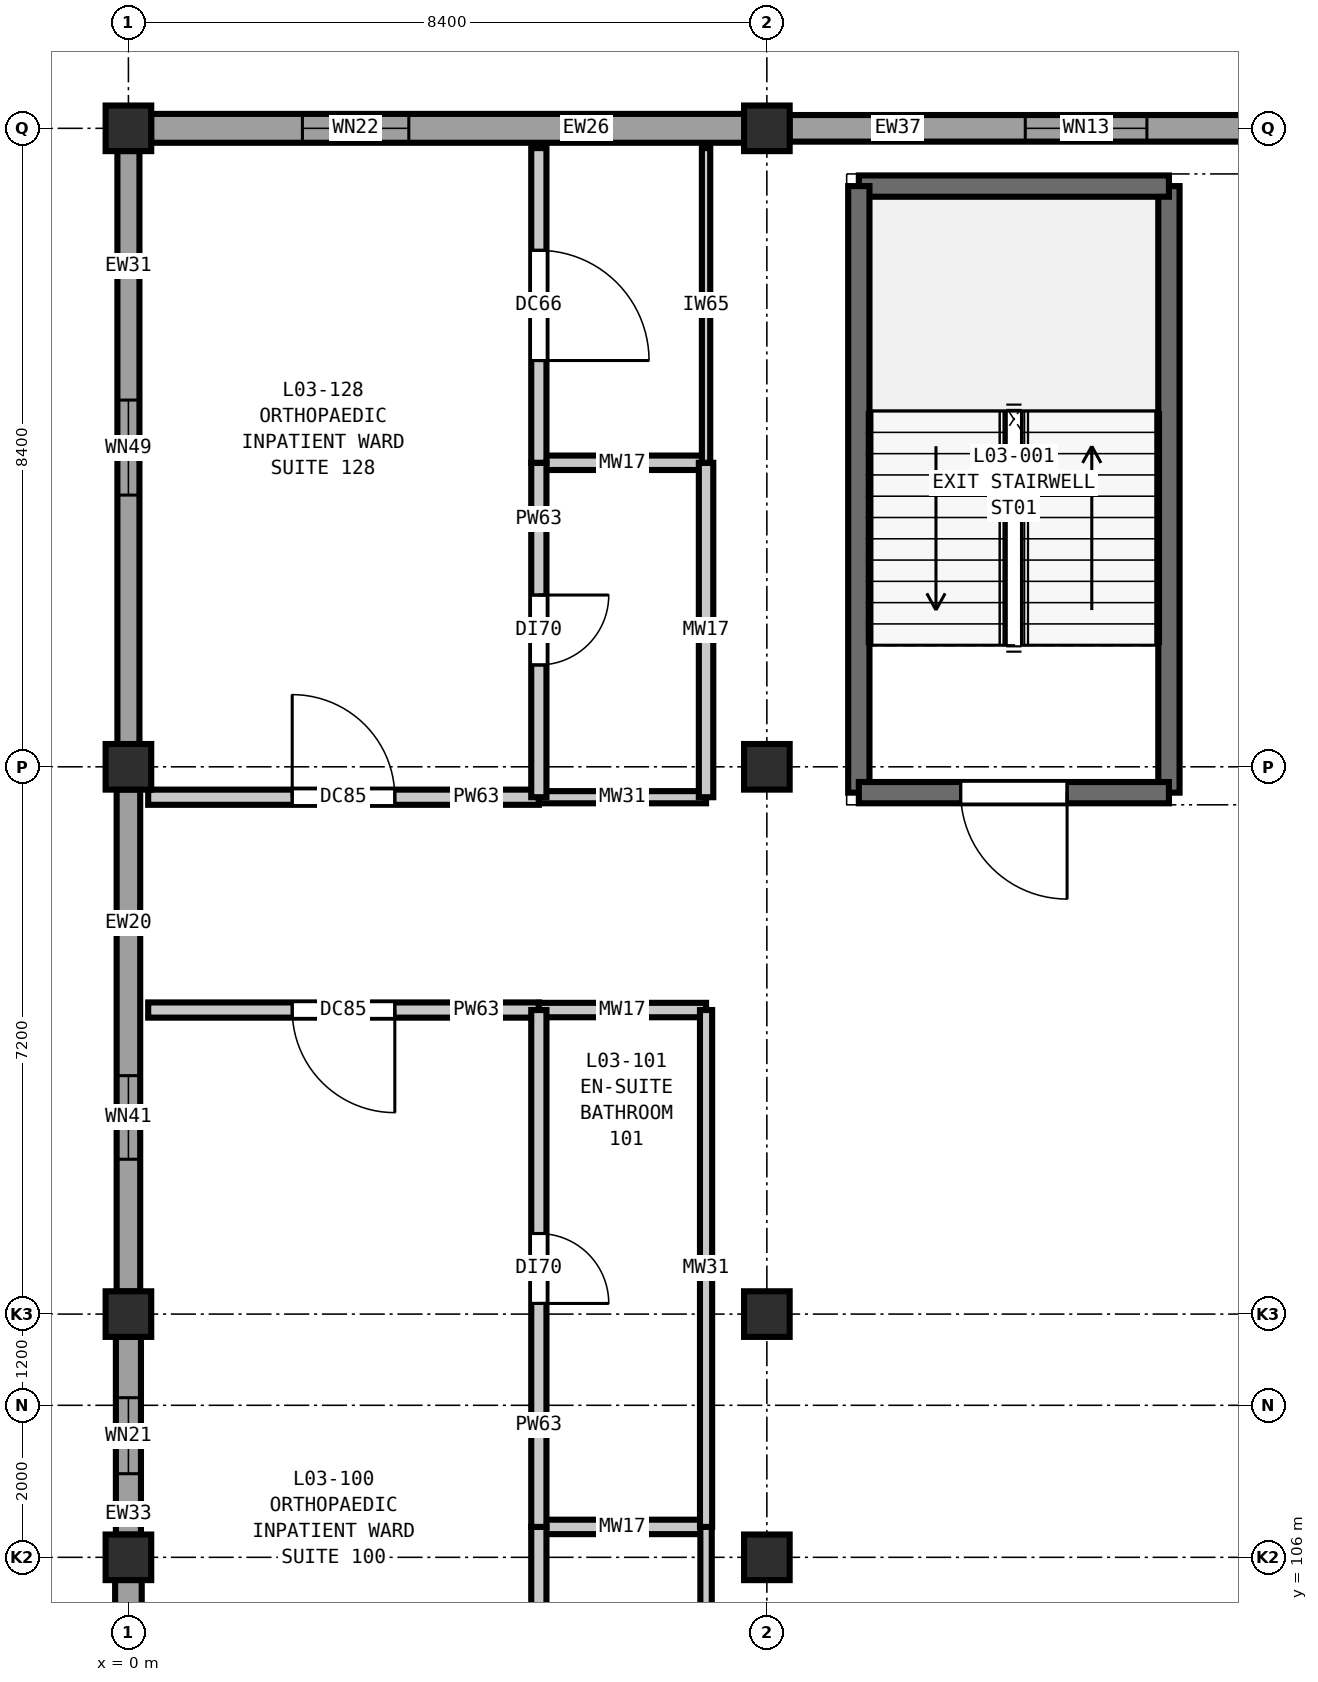
"""IFC4 building model, lengths in metres.
Left out: names, types, materials, properties, quantities, classifications, styles, units other than length and angle.
Written with IfcOpenShell. Run it as: python <this file> out.ifc"""

import sys

from ifc_helpers import new_model, si_unit, direction, frame, frame_2d, origin, origin_2d, place, context, subcontext, project, spatial, rectangle, extrude, element, fill, save


model = new_model("IFC4")
c1 = context("Model", 3, precision=1e-05, world=origin(), true_north=direction((0.0, 1.0)))
c2 = subcontext(c1, "Body", "Model", "MODEL_VIEW")
j1 = project(units=[si_unit("LENGTHUNIT", "METRE"), si_unit("PLANEANGLEUNIT", "RADIAN")], contexts=[c1])
p1 = place(None, origin())
s1 = spatial("IfcSite", under=j1, at=p1, CompositionType="ELEMENT")
p2 = place(p1, origin())
s2 = spatial("IfcBuilding", under=s1, at=p2, CompositionType="ELEMENT")
p3 = place(p2, frame((0.0, 0.0, 16.2)))
s3 = spatial("IfcBuildingStorey", under=s2, at=p3, CompositionType="ELEMENT", Elevation=16.2)
for number, where, z_axis, x_axis in (
    (1, (0.0, 106.0, 0.0), (0.0, 0.0, 1.0), (1.0, 0.0, 0.0)),
    (2, (0.0, 109.2, 0.0), (0.0, 0.0, 1.0), (1.0, 0.0, 0.0)),
    (3, (0.0, 116.4, 0.0), (0.0, 0.0, 1.0), (1.0, 0.0, 0.0)),
    (4, (0.0, 124.8, 0.0), (0.0, 0.0, 1.0), (1.0, 0.0, 0.0)),
    (5, (8.4, 106.0, 0.0), (0.0, 0.0, 1.0), (1.0, 0.0, 0.0)),
    (6, (8.4, 109.2, 0.0), (0.0, 0.0, 1.0), (1.0, 0.0, 0.0)),
    (7, (8.4, 116.4, 0.0), (0.0, 0.0, 1.0), (1.0, 0.0, 0.0)),
    (8, (8.4, 124.8, 0.0), (0.0, 0.0, 1.0), (1.0, 0.0, 0.0)),
):
    element("IfcColumn", number, at=place(p3, frame(where, z_axis=z_axis, x_axis=x_axis)), inside=s3, PredefinedType="COLUMN", context=c2, shape_type="SweptSolid", body=[
        extrude(rectangle(XDim=0.6, YDim=0.6, at=origin_2d()), origin(), (0.0, 0.0, 1.0), 4.2),
    ])
p4 = place(p3, frame((0.0, 103.098, 0.0), z_axis=(0.0, 0.0, 1.0), x_axis=(0.0, 1.0, 0.0)))
e9 = element("IfcWall", 9, at=p4, inside=s3, PredefinedType="SOLIDWALL", context=c2, shape_type="SweptSolid", body=[
    extrude(rectangle(XDim=2.604, YDim=0.35, at=frame_2d((1.302, 0.0))), origin(), (0.0, 0.0, 1.0), 3.48),
])
p5 = place(p4, frame((0.802, 0.0, 0.9)))
e10 = element("IfcOpeningElement", 10, at=p5, cuts=e9, PredefinedType="OPENING", context=c2, shape_type="SweptSolid", body=[
    extrude(rectangle(XDim=1.0, YDim=1.55, at=frame_2d((0.5, 0.775))), frame((0.0, 0.185, 0.0), z_axis=(0.0, -1.0, 0.0), x_axis=(1.0, 0.0, 0.0)), (0.0, 0.0, 1.0), 0.37),
])
p6 = place(p3, frame((0.0, 106.298, 0.0), z_axis=(0.0, 0.0, 1.0), x_axis=(0.0, 1.0, 0.0)))
e11 = element("IfcWall", 11, at=p6, inside=s3, PredefinedType="SOLIDWALL", context=c2, shape_type="SweptSolid", body=[
    extrude(rectangle(XDim=2.604, YDim=0.33, at=frame_2d((1.302, 0.0))), origin(), (0.0, 0.0, 1.0), 3.48),
])
p7 = place(p6, frame((0.802, 0.0, 0.9)))
e12 = element("IfcOpeningElement", 12, at=p7, cuts=e11, PredefinedType="OPENING", context=c2, shape_type="SweptSolid", body=[
    extrude(rectangle(XDim=1.0, YDim=1.55, at=frame_2d((0.5, 0.775))), frame((0.0, 0.175, 0.0), z_axis=(0.0, -1.0, 0.0), x_axis=(1.0, 0.0, 0.0)), (0.0, 0.0, 1.0), 0.35),
])
p8 = place(p3, frame((0.0, 109.498, 0.0), z_axis=(0.0, 0.0, 1.0), x_axis=(0.0, 1.0, 0.0)))
e13 = element("IfcWall", 13, at=p8, inside=s3, PredefinedType="SOLIDWALL", context=c2, shape_type="SweptSolid", body=[
    extrude(rectangle(XDim=6.604, YDim=0.31, at=frame_2d((3.302, 0.0))), origin(), (0.0, 0.0, 1.0), 3.48),
])
p9 = place(p8, frame((1.739, 0.0, 0.9)))
e14 = element("IfcOpeningElement", 14, at=p9, cuts=e13, PredefinedType="OPENING", context=c2, shape_type="SweptSolid", body=[
    extrude(rectangle(XDim=1.1, YDim=1.95, at=frame_2d((0.55, 0.975))), frame((0.0, 0.165, 0.0), z_axis=(0.0, -1.0, 0.0), x_axis=(1.0, 0.0, 0.0)), (0.0, 0.0, 1.0), 0.33),
])
p10 = place(p3, frame((0.0, 116.698, 0.0), z_axis=(0.0, 0.0, 1.0), x_axis=(0.0, 1.0, 0.0)))
e15 = element("IfcWall", 15, at=p10, inside=s3, PredefinedType="SOLIDWALL", context=c2, shape_type="SweptSolid", body=[
    extrude(rectangle(XDim=7.804, YDim=0.29, at=frame_2d((3.902, 0.0))), origin(), (0.0, 0.0, 1.0), 3.48),
])
p11 = place(p10, frame((3.277, 0.0, 0.9)))
e16 = element("IfcOpeningElement", 16, at=p11, cuts=e15, PredefinedType="OPENING", context=c2, shape_type="SweptSolid", body=[
    extrude(rectangle(XDim=1.25, YDim=1.95, at=frame_2d((0.625, 0.975))), frame((0.0, 0.155, 0.0), z_axis=(0.0, -1.0, 0.0), x_axis=(1.0, 0.0, 0.0)), (0.0, 0.0, 1.0), 0.31),
])
p12 = place(p3, frame((0.298, 124.8, 0.0), z_axis=(0.0, 0.0, 1.0), x_axis=(1.0, 0.0, 0.0)))
e17 = element("IfcWall", 17, at=p12, inside=s3, PredefinedType="SOLIDWALL", context=c2, shape_type="SweptSolid", body=[
    extrude(rectangle(XDim=7.804, YDim=0.38, at=frame_2d((3.902, 0.0))), origin(), (0.0, 0.0, 1.0), 3.48),
])
p13 = place(p12, frame((1.991, 0.0, 0.9)))
e18 = element("IfcOpeningElement", 18, at=p13, cuts=e17, PredefinedType="OPENING", context=c2, shape_type="SweptSolid", body=[
    extrude(rectangle(XDim=1.4, YDim=1.95, at=frame_2d((0.7, 0.975))), frame((0.0, 0.2, 0.0), z_axis=(0.0, -1.0, 0.0), x_axis=(1.0, 0.0, 0.0)), (0.0, 0.0, 1.0), 0.4),
])
p14 = place(p3, frame((8.698, 124.8, 0.0), z_axis=(0.0, 0.0, 1.0), x_axis=(1.0, 0.0, 0.0)))
e19 = element("IfcWall", 19, at=p14, inside=s3, PredefinedType="SOLIDWALL", context=c2, shape_type="SweptSolid", body=[
    extrude(rectangle(XDim=7.804, YDim=0.35, at=frame_2d((3.902, 0.0))), origin(), (0.0, 0.0, 1.0), 3.48),
])
p15 = place(p14, frame((3.102, 0.0, 0.9)))
e20 = element("IfcOpeningElement", 20, at=p15, cuts=e19, PredefinedType="OPENING", context=c2, shape_type="SweptSolid", body=[
    extrude(rectangle(XDim=1.6, YDim=1.95, at=frame_2d((0.8, 0.975))), frame((0.0, 0.185, 0.0), z_axis=(0.0, -1.0, 0.0), x_axis=(1.0, 0.0, 0.0)), (0.0, 0.0, 1.0), 0.37),
])
p16 = place(p3, frame((13.69, 116.06, 0.0), z_axis=(0.0, 0.0, 1.0), x_axis=(0.0, 1.0, 0.0)))
e21 = element("IfcWall", 21, at=p16, inside=s3, PredefinedType="SHEAR", context=c2, shape_type="SweptSolid", body=[
    extrude(rectangle(XDim=7.98, YDim=0.28, at=frame_2d((3.99, 0.0))), origin(), (0.0, 0.0, 1.0), 4.2),
])
p17 = place(p3, frame((13.69, 124.04, 0.0), z_axis=(0.0, 0.0, 1.0), x_axis=(-1.0, 0.0, 0.0)))
e22 = element("IfcWall", 22, at=p17, inside=s3, PredefinedType="SHEAR", context=c2, shape_type="SweptSolid", body=[
    extrude(rectangle(XDim=4.08, YDim=0.28, at=frame_2d((2.04, 0.0))), origin(), (0.0, 0.0, 1.0), 4.2),
])
p18 = place(p3, frame((9.61, 124.04, 0.0), z_axis=(0.0, 0.0, 1.0), x_axis=(0.0, -1.0, 0.0)))
e23 = element("IfcWall", 23, at=p18, inside=s3, PredefinedType="SHEAR", context=c2, shape_type="SweptSolid", body=[
    extrude(rectangle(XDim=7.98, YDim=0.28, at=frame_2d((3.99, 0.0))), origin(), (0.0, 0.0, 1.0), 4.2),
])
p19 = place(p3, frame((9.61, 116.06, 0.0), z_axis=(0.0, 0.0, 1.0), x_axis=(1.0, 0.0, 0.0)))
e24 = element("IfcWall", 24, at=p19, inside=s3, PredefinedType="SHEAR", context=c2, shape_type="SweptSolid", body=[
    extrude(rectangle(XDim=4.08, YDim=0.28, at=frame_2d((2.04, 0.0))), origin(), (0.0, 0.0, 1.0), 4.2),
])
p20 = place(p19, frame((1.34, 0.0, 0.0)))
e25 = element("IfcOpeningElement", 25, at=p20, cuts=e24, PredefinedType="OPENING", context=c2, shape_type="SweptSolid", body=[
    extrude(rectangle(XDim=1.4, YDim=2.2, at=frame_2d((0.7, 1.1))), frame((0.0, 0.15, 0.0), z_axis=(0.0, -1.0, 0.0), x_axis=(1.0, 0.0, 0.0)), (0.0, 0.0, 1.0), 0.3),
])
p21 = place(p3, frame((5.4, 106.4, 0.0), z_axis=(0.0, 0.0, 1.0), x_axis=(1.0, 0.0, 0.0)))
e26 = element("IfcWall", 26, at=p21, inside=s3, PredefinedType="PLUMBINGWALL", context=c2, shape_type="SweptSolid", body=[
    extrude(rectangle(XDim=2.2, YDim=0.19, at=frame_2d((1.1, 0.0))), origin(), (0.0, 0.0, 1.0), 3.89),
])
p22 = place(p3, frame((0.26, 113.2, 0.0), z_axis=(0.0, 0.0, 1.0), x_axis=(1.0, 0.0, 0.0)))
e27 = element("IfcWall", 27, at=p22, inside=s3, PredefinedType="PARTITIONING", context=c2, shape_type="SweptSolid", body=[
    extrude(rectangle(XDim=5.14, YDim=0.2, at=frame_2d((2.57, 0.0))), origin(), (0.0, 0.0, 1.0), 3.89),
])
p23 = place(p22, frame((1.895, 0.0, 0.0)))
e28 = element("IfcOpeningElement", 28, at=p23, cuts=e27, PredefinedType="OPENING", context=c2, shape_type="SweptSolid", body=[
    extrude(rectangle(XDim=1.35, YDim=2.2, at=frame_2d((0.675, 1.1))), frame((0.0, 0.11, 0.0), z_axis=(0.0, -1.0, 0.0), x_axis=(1.0, 0.0, 0.0)), (0.0, 0.0, 1.0), 0.22),
])
p24 = place(p3, frame((5.4, 113.2, 0.0), z_axis=(0.0, 0.0, 1.0), x_axis=(1.0, 0.0, 0.0)))
e29 = element("IfcWall", 29, at=p24, inside=s3, PredefinedType="PLUMBINGWALL", context=c2, shape_type="SweptSolid", body=[
    extrude(rectangle(XDim=2.2, YDim=0.19, at=frame_2d((1.1, 0.0))), origin(), (0.0, 0.0, 1.0), 3.89),
])
p25 = place(p3, frame((0.26, 116.0, 0.0), z_axis=(0.0, 0.0, 1.0), x_axis=(1.0, 0.0, 0.0)))
e30 = element("IfcWall", 30, at=p25, inside=s3, PredefinedType="PARTITIONING", context=c2, shape_type="SweptSolid", body=[
    extrude(rectangle(XDim=5.14, YDim=0.2, at=frame_2d((2.57, 0.0))), origin(), (0.0, 0.0, 1.0), 3.89),
])
p26 = place(p25, frame((1.895, 0.0, 0.0)))
e31 = element("IfcOpeningElement", 31, at=p26, cuts=e30, PredefinedType="OPENING", context=c2, shape_type="SweptSolid", body=[
    extrude(rectangle(XDim=1.35, YDim=2.2, at=frame_2d((0.675, 1.1))), frame((0.0, 0.11, 0.0), z_axis=(0.0, -1.0, 0.0), x_axis=(1.0, 0.0, 0.0)), (0.0, 0.0, 1.0), 0.22),
])
p27 = place(p3, frame((5.4, 116.0, 0.0), z_axis=(0.0, 0.0, 1.0), x_axis=(1.0, 0.0, 0.0)))
e32 = element("IfcWall", 32, at=p27, inside=s3, PredefinedType="PLUMBINGWALL", context=c2, shape_type="SweptSolid", body=[
    extrude(rectangle(XDim=2.2, YDim=0.16, at=frame_2d((1.1, 0.0))), origin(), (0.0, 0.0, 1.0), 3.89),
])
p28 = place(p3, frame((5.4, 120.4, 0.0), z_axis=(0.0, 0.0, 1.0), x_axis=(1.0, 0.0, 0.0)))
e33 = element("IfcWall", 33, at=p28, inside=s3, PredefinedType="PLUMBINGWALL", context=c2, shape_type="SweptSolid", body=[
    extrude(rectangle(XDim=2.2, YDim=0.19, at=frame_2d((1.1, 0.0))), origin(), (0.0, 0.0, 1.0), 3.89),
])
p29 = place(p3, frame((5.4, 99.6, 0.0), z_axis=(0.0, 0.0, 1.0), x_axis=(0.0, 1.0, 0.0)))
e34 = element("IfcWall", 34, at=p29, inside=s3, PredefinedType="PARTITIONING", context=c2, shape_type="SweptSolid", body=[
    extrude(rectangle(XDim=6.8, YDim=0.2, at=frame_2d((3.4, 0.0))), origin(), (0.0, 0.0, 1.0), 3.89),
])
p30 = place(p29, frame((2.775, 0.0, 0.0)))
e35 = element("IfcOpeningElement", 35, at=p30, cuts=e34, PredefinedType="OPENING", context=c2, shape_type="SweptSolid", body=[
    extrude(rectangle(XDim=1.25, YDim=2.15, at=frame_2d((0.625, 1.075))), frame((0.0, 0.11, 0.0), z_axis=(0.0, -1.0, 0.0), x_axis=(1.0, 0.0, 0.0)), (0.0, 0.0, 1.0), 0.22),
])
p31 = place(p3, frame((5.4, 106.4, 0.0), z_axis=(0.0, 0.0, 1.0), x_axis=(0.0, 1.0, 0.0)))
e36 = element("IfcWall", 36, at=p31, inside=s3, PredefinedType="PARTITIONING", context=c2, shape_type="SweptSolid", body=[
    extrude(rectangle(XDim=6.8, YDim=0.2, at=frame_2d((3.4, 0.0))), origin(), (0.0, 0.0, 1.0), 3.89),
])
p32 = place(p31, frame((2.94, 0.0, 0.0)))
e37 = element("IfcOpeningElement", 37, at=p32, cuts=e36, PredefinedType="OPENING", context=c2, shape_type="SweptSolid", body=[
    extrude(rectangle(XDim=0.92, YDim=2.1, at=frame_2d((0.46, 1.05))), frame((0.0, 0.11, 0.0), z_axis=(0.0, -1.0, 0.0), x_axis=(1.0, 0.0, 0.0)), (0.0, 0.0, 1.0), 0.22),
])
p33 = place(p3, frame((5.4, 116.0, 0.0), z_axis=(0.0, 0.0, 1.0), x_axis=(0.0, 1.0, 0.0)))
e38 = element("IfcWall", 38, at=p33, inside=s3, PredefinedType="PARTITIONING", context=c2, shape_type="SweptSolid", body=[
    extrude(rectangle(XDim=4.4, YDim=0.2, at=frame_2d((2.2, 0.0))), origin(), (0.0, 0.0, 1.0), 3.89),
])
p34 = place(p33, frame((1.74, 0.0, 0.0)))
e39 = element("IfcOpeningElement", 39, at=p34, cuts=e38, PredefinedType="OPENING", context=c2, shape_type="SweptSolid", body=[
    extrude(rectangle(XDim=0.92, YDim=2.1, at=frame_2d((0.46, 1.05))), frame((0.0, 0.11, 0.0), z_axis=(0.0, -1.0, 0.0), x_axis=(1.0, 0.0, 0.0)), (0.0, 0.0, 1.0), 0.22),
])
p35 = place(p3, frame((5.4, 120.4, 0.0), z_axis=(0.0, 0.0, 1.0), x_axis=(0.0, 1.0, 0.0)))
e40 = element("IfcWall", 40, at=p35, inside=s3, PredefinedType="PARTITIONING", context=c2, shape_type="SweptSolid", body=[
    extrude(rectangle(XDim=4.14, YDim=0.2, at=frame_2d((2.07, 0.0))), origin(), (0.0, 0.0, 1.0), 3.89),
])
p36 = place(p35, frame((1.345, 0.0, 0.0)))
e41 = element("IfcOpeningElement", 41, at=p36, cuts=e40, PredefinedType="OPENING", context=c2, shape_type="SweptSolid", body=[
    extrude(rectangle(XDim=1.45, YDim=2.25, at=frame_2d((0.725, 1.125))), frame((0.0, 0.11, 0.0), z_axis=(0.0, -1.0, 0.0), x_axis=(1.0, 0.0, 0.0)), (0.0, 0.0, 1.0), 0.22),
])
p37 = place(p3, frame((7.6, 99.6, 0.0), z_axis=(0.0, 0.0, 1.0), x_axis=(0.0, 1.0, 0.0)))
e42 = element("IfcWall", 42, at=p37, inside=s3, PredefinedType="PARTITIONING", context=c2, shape_type="SweptSolid", body=[
    extrude(rectangle(XDim=6.8, YDim=0.15, at=frame_2d((3.4, 0.0))), origin(), (0.0, 0.0, 1.0), 3.89),
])
p38 = place(p3, frame((7.6, 106.4, 0.0), z_axis=(0.0, 0.0, 1.0), x_axis=(0.0, 1.0, 0.0)))
e43 = element("IfcWall", 43, at=p38, inside=s3, PredefinedType="PLUMBINGWALL", context=c2, shape_type="SweptSolid", body=[
    extrude(rectangle(XDim=6.8, YDim=0.16, at=frame_2d((3.4, 0.0))), origin(), (0.0, 0.0, 1.0), 3.89),
])
p39 = place(p3, frame((7.6, 116.0, 0.0), z_axis=(0.0, 0.0, 1.0), x_axis=(0.0, 1.0, 0.0)))
e44 = element("IfcWall", 44, at=p39, inside=s3, PredefinedType="PLUMBINGWALL", context=c2, shape_type="SweptSolid", body=[
    extrude(rectangle(XDim=4.4, YDim=0.19, at=frame_2d((2.2, 0.0))), origin(), (0.0, 0.0, 1.0), 3.89),
])
p40 = place(p3, frame((7.6, 120.4, 0.0), z_axis=(0.0, 0.0, 1.0), x_axis=(0.0, 1.0, 0.0)))
e45 = element("IfcWall", 45, at=p40, inside=s3, PredefinedType="PARTITIONING", context=c2, shape_type="SweptSolid", body=[
    extrude(rectangle(XDim=4.14, YDim=0.11, at=frame_2d((2.07, 0.0))), origin(), (0.0, 0.0, 1.0), 3.89),
])
p41 = place(p7, origin())
e46 = element("IfcWindow", 46, at=p41, inside=s3, PartitioningType="SINGLE_PANEL", PredefinedType="WINDOW", context=c2, shape_type="SweptSolid", body=[
    extrude(rectangle(XDim=1.0, YDim=1.55, at=frame_2d((0.5, 0.775))), frame((0.0, 0.03, 0.0), z_axis=(0.0, -1.0, 0.0), x_axis=(1.0, 0.0, 0.0)), (0.0, 0.0, 1.0), 0.06),
])
fill(e12, e46)
p42 = place(p9, origin())
e47 = element("IfcWindow", 47, at=p42, inside=s3, PartitioningType="SINGLE_PANEL", PredefinedType="WINDOW", context=c2, shape_type="SweptSolid", body=[
    extrude(rectangle(XDim=1.1, YDim=1.95, at=frame_2d((0.55, 0.975))), frame((0.0, 0.03, 0.0), z_axis=(0.0, -1.0, 0.0), x_axis=(1.0, 0.0, 0.0)), (0.0, 0.0, 1.0), 0.06),
])
fill(e14, e47)
p43 = place(p11, origin())
e48 = element("IfcWindow", 48, at=p43, inside=s3, PartitioningType="SINGLE_PANEL", PredefinedType="WINDOW", context=c2, shape_type="SweptSolid", body=[
    extrude(rectangle(XDim=1.25, YDim=1.95, at=frame_2d((0.625, 0.975))), frame((0.0, 0.03, 0.0), z_axis=(0.0, -1.0, 0.0), x_axis=(1.0, 0.0, 0.0)), (0.0, 0.0, 1.0), 0.06),
])
fill(e16, e48)
p44 = place(p13, origin())
e49 = element("IfcWindow", 49, at=p44, inside=s3, PartitioningType="SINGLE_PANEL", PredefinedType="WINDOW", context=c2, shape_type="SweptSolid", body=[
    extrude(rectangle(XDim=1.4, YDim=1.95, at=frame_2d((0.7, 0.975))), frame((0.0, 0.03, 0.0), z_axis=(0.0, -1.0, 0.0), x_axis=(1.0, 0.0, 0.0)), (0.0, 0.0, 1.0), 0.06),
])
fill(e18, e49)
p45 = place(p15, origin())
e50 = element("IfcWindow", 50, at=p45, inside=s3, PartitioningType="DOUBLE_PANEL_VERTICAL", PredefinedType="WINDOW", context=c2, shape_type="SweptSolid", body=[
    extrude(rectangle(XDim=1.6, YDim=1.95, at=frame_2d((0.8, 0.975))), frame((0.0, 0.03, 0.0), z_axis=(0.0, -1.0, 0.0), x_axis=(1.0, 0.0, 0.0)), (0.0, 0.0, 1.0), 0.06),
])
fill(e20, e50)
p46 = place(p20, frame((1.4, 0.0, 0.0), z_axis=(0.0, 0.0, 1.0), x_axis=(-1.0, 0.0, 0.0)))
e51 = element("IfcDoor", 51, at=p46, inside=s3, OperationType="SINGLE_SWING_LEFT", PredefinedType="DOOR", context=c2, shape_type="SweptSolid", body=[
    extrude(rectangle(XDim=1.4, YDim=2.2, at=frame_2d((0.7, 1.1))), frame((0.0, 0.025, 0.0), z_axis=(0.0, -1.0, 0.0), x_axis=(1.0, 0.0, 0.0)), (0.0, 0.0, 1.0), 0.05),
])
fill(e25, e51)
p47 = place(p23, frame((1.35, 0.0, 0.0), z_axis=(0.0, 0.0, 1.0), x_axis=(-1.0, 0.0, 0.0)))
e52 = element("IfcDoor", 52, at=p47, inside=s3, OperationType="SINGLE_SWING_LEFT", PredefinedType="DOOR", context=c2, shape_type="SweptSolid", body=[
    extrude(rectangle(XDim=1.35, YDim=2.2, at=frame_2d((0.675, 1.1))), frame((0.0, 0.025, 0.0), z_axis=(0.0, -1.0, 0.0), x_axis=(1.0, 0.0, 0.0)), (0.0, 0.0, 1.0), 0.05),
])
fill(e28, e52)
p48 = place(p26, origin())
e53 = element("IfcDoor", 53, at=p48, inside=s3, OperationType="SINGLE_SWING_LEFT", PredefinedType="DOOR", context=c2, shape_type="SweptSolid", body=[
    extrude(rectangle(XDim=1.35, YDim=2.2, at=frame_2d((0.675, 1.1))), frame((0.0, 0.025, 0.0), z_axis=(0.0, -1.0, 0.0), x_axis=(1.0, 0.0, 0.0)), (0.0, 0.0, 1.0), 0.05),
])
fill(e31, e53)
p49 = place(p32, frame((0.92, 0.0, 0.0), z_axis=(0.0, 0.0, 1.0), x_axis=(-1.0, 0.0, 0.0)))
e54 = element("IfcDoor", 54, at=p49, inside=s3, OperationType="SINGLE_SWING_RIGHT", PredefinedType="DOOR", context=c2, shape_type="SweptSolid", body=[
    extrude(rectangle(XDim=0.92, YDim=2.1, at=frame_2d((0.46, 1.05))), frame((0.0, 0.025, 0.0), z_axis=(0.0, -1.0, 0.0), x_axis=(1.0, 0.0, 0.0)), (0.0, 0.0, 1.0), 0.05),
])
fill(e37, e54)
p50 = place(p34, frame((0.92, 0.0, 0.0), z_axis=(0.0, 0.0, 1.0), x_axis=(-1.0, 0.0, 0.0)))
e55 = element("IfcDoor", 55, at=p50, inside=s3, OperationType="SINGLE_SWING_LEFT", PredefinedType="DOOR", context=c2, shape_type="SweptSolid", body=[
    extrude(rectangle(XDim=0.92, YDim=2.1, at=frame_2d((0.46, 1.05))), frame((0.0, 0.025, 0.0), z_axis=(0.0, -1.0, 0.0), x_axis=(1.0, 0.0, 0.0)), (0.0, 0.0, 1.0), 0.05),
])
fill(e39, e55)
p51 = place(p36, frame((1.45, 0.0, 0.0), z_axis=(0.0, 0.0, 1.0), x_axis=(-1.0, 0.0, 0.0)))
e56 = element("IfcDoor", 56, at=p51, inside=s3, OperationType="SINGLE_SWING_RIGHT", PredefinedType="DOOR", context=c2, shape_type="SweptSolid", body=[
    extrude(rectangle(XDim=1.45, YDim=2.25, at=frame_2d((0.725, 1.125))), frame((0.0, 0.025, 0.0), z_axis=(0.0, -1.0, 0.0), x_axis=(1.0, 0.0, 0.0)), (0.0, 0.0, 1.0), 0.05),
])
fill(e41, e56)
save(model, sys.argv[1])
